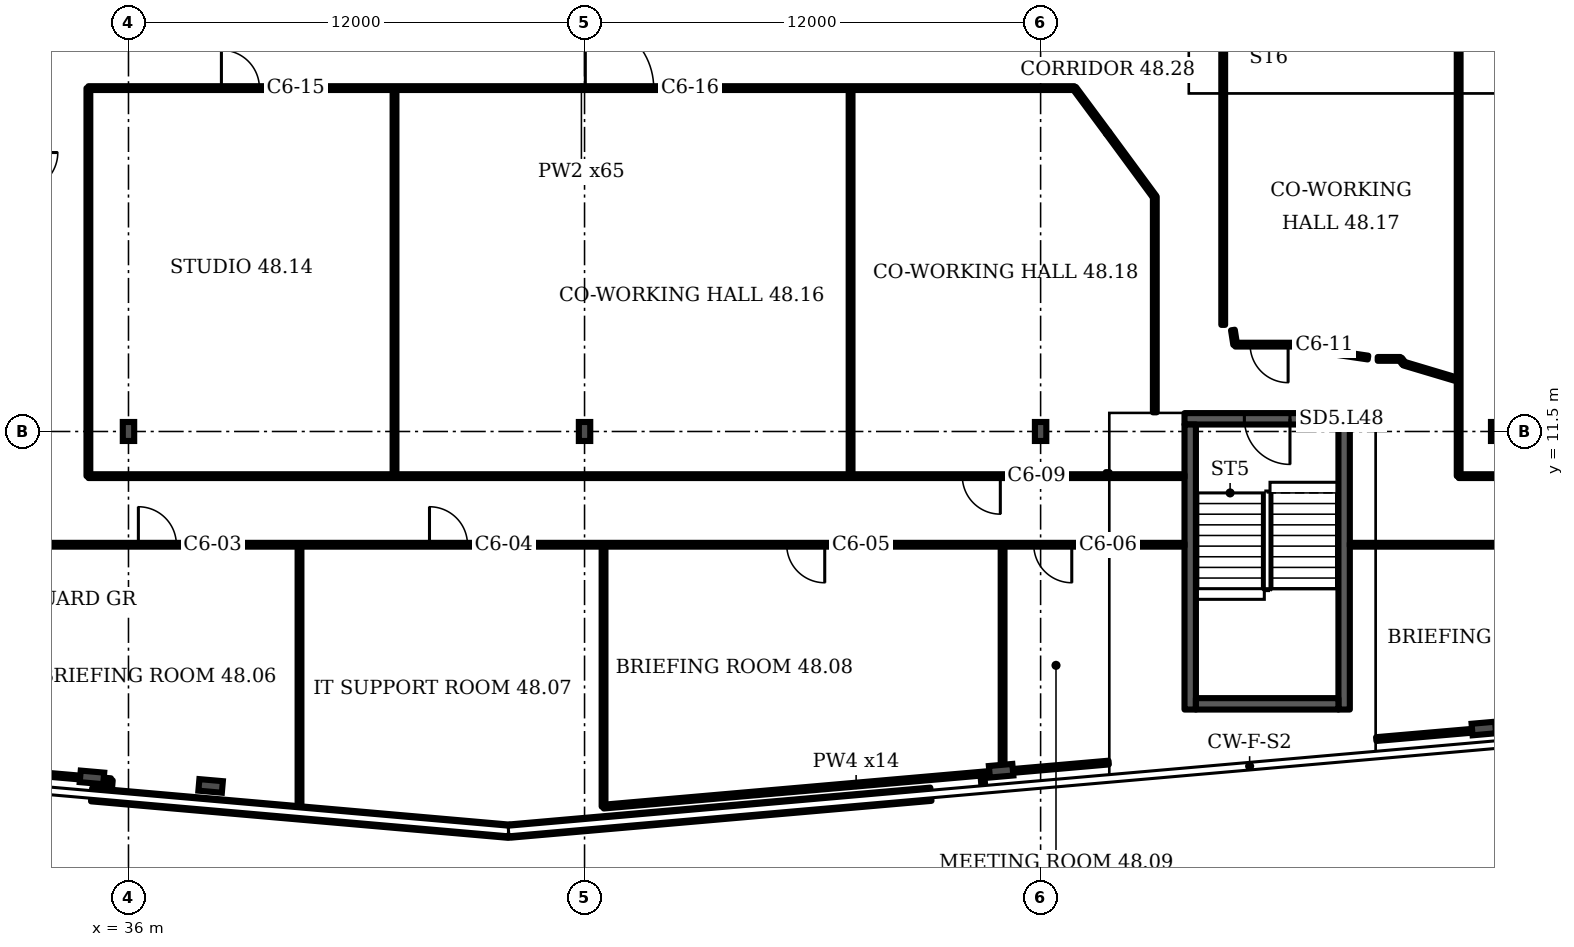
"""IFC4 building model, lengths in metres.
Left out: names, types, materials, properties, quantities, classifications, styles, units other than length and angle.
Written with IfcOpenShell. Run it as: python <this file> out.ifc"""

import sys

from ifc_helpers import new_model, si_unit, direction, frame, frame_2d, origin, origin_2d, place, context, subcontext, project, spatial, rectangle, i_section, extrude, element, fill, save


model = new_model("IFC4")
c1 = context("Model", 3, precision=1e-05, world=origin(), true_north=direction((0.0, 1.0)))
c2 = subcontext(c1, "Body", "Model", "MODEL_VIEW")
j1 = project(units=[si_unit("LENGTHUNIT", "METRE"), si_unit("PLANEANGLEUNIT", "RADIAN")], contexts=[c1])
p1 = place(None, origin())
s1 = spatial("IfcSite", under=j1, at=p1, CompositionType="ELEMENT")
p2 = place(p1, origin())
s2 = spatial("IfcBuilding", under=s1, at=p2, CompositionType="ELEMENT")
p3 = place(p2, frame((0.0, 0.0, 195.1)))
s3 = spatial("IfcBuildingStorey", under=s2, at=p3, CompositionType="ELEMENT", Elevation=195.1)
for number, where, z_axis, x_axis in (
    (1, (35.039, 2.399, 0.0), (0.0, 0.0, 1.0), (-0.087, -0.996, 0.0)),
    (2, (38.161, 2.174, 0.0), (0.0, 0.0, 1.0), (-0.087, -0.996, 0.0)),
    (3, (58.961, 2.573, 0.0), (0.0, 0.0, 1.0), (0.087, -0.996, 0.0)),
    (4, (71.662, 3.685, 0.0), (0.0, 0.0, 1.0), (0.087, -0.996, 0.0)),
):
    element("IfcColumn", number, at=place(p3, frame(where, z_axis=z_axis, x_axis=x_axis)), inside=s3, PredefinedType="COLUMN", context=c2, shape_type="SweptSolid", body=[
        extrude(i_section(OverallWidth=0.305, OverallDepth=0.62, WebThickness=0.021, FlangeThickness=0.04, FilletRadius=0.027, at=origin_2d()), origin(), (0.0, 0.0, 1.0), 3.6),
    ])
for number, where, z_axis, x_axis in (
    (5, (36.0, 11.5, 0.0), (0.0, 0.0, 1.0), (1.0, 0.0, 0.0)),
    (6, (48.0, 11.5, 0.0), (0.0, 0.0, 1.0), (1.0, 0.0, 0.0)),
    (7, (60.0, 11.5, 0.0), (0.0, 0.0, 1.0), (1.0, 0.0, 0.0)),
    (8, (72.0, 11.5, 0.0), (0.0, 0.0, 1.0), (1.0, 0.0, 0.0)),
):
    element("IfcColumn", number, at=place(p3, frame(where, z_axis=z_axis, x_axis=x_axis)), inside=s3, PredefinedType="COLUMN", context=c2, shape_type="SweptSolid", body=[
        extrude(i_section(OverallWidth=0.3, OverallDepth=0.5, WebThickness=0.014, FlangeThickness=0.028, FilletRadius=0.027, at=origin_2d()), origin(), (0.0, 0.0, 1.0), 3.6),
    ])
p4 = place(p3, frame((35.03, 1.943, 0.0), z_axis=(0.0, 0.0, 1.0), x_axis=(0.996199, -0.08714, 0.0)))
e9 = element("IfcWall", 9, at=p4, inside=s3, PredefinedType="SOLIDWALL", context=c2, shape_type="SweptSolid", body=[
    extrude(rectangle(XDim=11.028, YDim=0.35, at=frame_2d((5.514, 0.0))), origin(), (0.0, 0.0, 1.0), 1.0),
])
p5 = place(p3, frame((46.045, 0.987, 0.0), z_axis=(0.0, 0.0, 1.0), x_axis=(0.996193, 0.087171, 0.0)))
e10 = element("IfcWall", 10, at=p5, inside=s3, PredefinedType="SOLIDWALL", context=c2, shape_type="SweptSolid", body=[
    extrude(rectangle(XDim=11.11, YDim=0.35, at=frame_2d((5.555, 0.0))), origin(), (0.0, 0.0, 1.0), 1.0),
])
p6 = place(p3, frame((63.786, 11.834, 0.0), z_axis=(0.0, 0.0, 1.0), x_axis=(1.0, 0.0, 0.0)))
e11 = element("IfcWall", 11, at=p6, inside=s3, PredefinedType="SHEAR", context=c2, shape_type="SweptSolid", body=[
    extrude(rectangle(XDim=4.35, YDim=0.3, at=frame_2d((2.175, 0.0))), origin(), (0.0, 0.0, 1.0), 3.2),
])
p7 = place(p6, frame((1.575, 0.0, 0.0)))
e12 = element("IfcOpeningElement", 12, at=p7, cuts=e11, PredefinedType="OPENING", context=c2, shape_type="SweptSolid", body=[
    extrude(rectangle(XDim=1.2, YDim=2.1, at=frame_2d((0.6, 1.05))), frame((0.0, 0.16, 0.0), z_axis=(0.0, -1.0, 0.0), x_axis=(1.0, 0.0, 0.0)), (0.0, 0.0, 1.0), 0.32),
])
p8 = place(p3, frame((31.714, 8.52, 0.0), z_axis=(0.0, 0.0, 1.0), x_axis=(1.0, 0.0, 0.0)))
e13 = element("IfcWall", 13, at=p8, inside=s3, PredefinedType="PARTITIONING", context=c2, shape_type="SweptSolid", body=[
    extrude(rectangle(XDim=32.072, YDim=0.1, at=frame_2d((16.036, 0.0))), origin(), (0.0, 0.0, 1.0), 3.2),
])
p9 = place(p8, frame((4.546, 0.0, 0.0)))
e14 = element("IfcOpeningElement", 14, at=p9, cuts=e13, PredefinedType="OPENING", context=c2, shape_type="SweptSolid", body=[
    extrude(rectangle(XDim=1.0, YDim=2.1, at=frame_2d((0.5, 1.05))), frame((0.0, 0.06, 0.0), z_axis=(0.0, -1.0, 0.0), x_axis=(1.0, 0.0, 0.0)), (0.0, 0.0, 1.0), 0.12),
])
p10 = place(p8, frame((12.206, 0.0, 0.0)))
e15 = element("IfcOpeningElement", 15, at=p10, cuts=e13, PredefinedType="OPENING", context=c2, shape_type="SweptSolid", body=[
    extrude(rectangle(XDim=1.0, YDim=2.1, at=frame_2d((0.5, 1.05))), frame((0.0, 0.06, 0.0), z_axis=(0.0, -1.0, 0.0), x_axis=(1.0, 0.0, 0.0)), (0.0, 0.0, 1.0), 0.12),
])
p11 = place(p8, frame((21.606, 0.0, 0.0)))
e16 = element("IfcOpeningElement", 16, at=p11, cuts=e13, PredefinedType="OPENING", context=c2, shape_type="SweptSolid", body=[
    extrude(rectangle(XDim=1.0, YDim=2.1, at=frame_2d((0.5, 1.05))), frame((0.0, 0.06, 0.0), z_axis=(0.0, -1.0, 0.0), x_axis=(1.0, 0.0, 0.0)), (0.0, 0.0, 1.0), 0.12),
])
p12 = place(p8, frame((28.106, 0.0, 0.0)))
e17 = element("IfcOpeningElement", 17, at=p12, cuts=e13, PredefinedType="OPENING", context=c2, shape_type="SweptSolid", body=[
    extrude(rectangle(XDim=1.0, YDim=2.1, at=frame_2d((0.5, 1.05))), frame((0.0, 0.06, 0.0), z_axis=(0.0, -1.0, 0.0), x_axis=(1.0, 0.0, 0.0)), (0.0, 0.0, 1.0), 0.12),
])
p13 = place(p3, frame((34.945, 10.325, 0.0), z_axis=(0.0, 0.0, 1.0), x_axis=(0.0, 1.0, 0.0)))
e18 = element("IfcWall", 18, at=p13, inside=s3, PredefinedType="PARTITIONING", context=c2, shape_type="SweptSolid", body=[
    extrude(rectangle(XDim=10.21, YDim=0.1, at=frame_2d((5.105, 0.0))), origin(), (0.0, 0.0, 1.0), 3.2),
])
p14 = place(p3, frame((34.945, 10.325, 0.0), z_axis=(0.0, 0.0, 1.0), x_axis=(1.0, 0.0, 0.0)))
e19 = element("IfcWall", 19, at=p14, inside=s3, PredefinedType="PARTITIONING", context=c2, shape_type="SweptSolid", body=[
    extrude(rectangle(XDim=28.841, YDim=0.1, at=frame_2d((14.421, 0.0))), origin(), (0.0, 0.0, 1.0), 3.2),
])
p15 = place(p14, frame((22.995, 0.0, 0.0)))
e20 = element("IfcOpeningElement", 20, at=p15, cuts=e19, PredefinedType="OPENING", context=c2, shape_type="SweptSolid", body=[
    extrude(rectangle(XDim=1.0, YDim=2.1, at=frame_2d((0.5, 1.05))), frame((0.0, 0.06, 0.0), z_axis=(0.0, -1.0, 0.0), x_axis=(1.0, 0.0, 0.0)), (0.0, 0.0, 1.0), 0.12),
])
p16 = place(p3, frame((34.945, 20.535, 0.0), z_axis=(0.0, 0.0, 1.0), x_axis=(1.0, 0.0, 0.0)))
e21 = element("IfcWall", 21, at=p16, inside=s3, PredefinedType="PARTITIONING", context=c2, shape_type="SweptSolid", body=[
    extrude(rectangle(XDim=25.945, YDim=0.1, at=frame_2d((12.972, 0.0))), origin(), (0.0, 0.0, 1.0), 3.2),
])
p17 = place(p16, frame((3.5, 0.0, 0.0)))
e22 = element("IfcOpeningElement", 22, at=p17, cuts=e21, PredefinedType="OPENING", context=c2, shape_type="SweptSolid", body=[
    extrude(rectangle(XDim=1.0, YDim=2.1, at=frame_2d((0.5, 1.05))), frame((0.0, 0.06, 0.0), z_axis=(0.0, -1.0, 0.0), x_axis=(1.0, 0.0, 0.0)), (0.0, 0.0, 1.0), 0.12),
])
p18 = place(p16, frame((13.075, 0.0, 0.0)))
e23 = element("IfcOpeningElement", 23, at=p18, cuts=e21, PredefinedType="OPENING", context=c2, shape_type="SweptSolid", body=[
    extrude(rectangle(XDim=1.8, YDim=2.1, at=frame_2d((0.9, 1.05))), frame((0.0, 0.06, 0.0), z_axis=(0.0, -1.0, 0.0), x_axis=(1.0, 0.0, 0.0)), (0.0, 0.0, 1.0), 0.12),
])
p19 = place(p3, frame((35.502, 1.927, 0.0), z_axis=(0.0, 0.0, 1.0), x_axis=(0.083045, 0.996542, 0.0)))
e24 = element("IfcWall", 24, at=p19, inside=s3, PredefinedType="PARTITIONING", context=c2, shape_type="SweptSolid", body=[
    extrude(rectangle(XDim=0.4, YDim=0.1, at=frame_2d((0.2, 0.0))), origin(), (0.0, 0.0, 1.0), 3.2),
])
p20 = place(p3, frame((35.535, 2.325, 0.0), z_axis=(0.0, 0.0, 1.0), x_axis=(-0.996311, 0.085867, 0.0)))
e25 = element("IfcWall", 25, at=p20, inside=s3, PredefinedType="PARTITIONING", context=c2, shape_type="SweptSolid", body=[
    extrude(rectangle(XDim=2.485, YDim=0.1, at=frame_2d((1.243, 0.0))), origin(), (0.0, 0.0, 1.0), 2.58),
])
p21 = place(p3, frame((40.5, 1.489, 0.0), z_axis=(0.0, 0.0, 1.0), x_axis=(0.0, 1.0, 0.0)))
e26 = element("IfcWall", 26, at=p21, inside=s3, PredefinedType="PARTITIONING", context=c2, shape_type="SweptSolid", body=[
    extrude(rectangle(XDim=7.031, YDim=0.1, at=frame_2d((3.515, 0.0))), origin(), (0.0, 0.0, 1.0), 3.2),
])
p22 = place(p3, frame((43.0, 10.33, 0.0), z_axis=(0.0, 0.0, 1.0), x_axis=(0.0, 1.0, 0.0)))
e27 = element("IfcWall", 27, at=p22, inside=s3, PredefinedType="PARTITIONING", context=c2, shape_type="SweptSolid", body=[
    extrude(rectangle(XDim=10.205, YDim=0.1, at=frame_2d((5.103, 0.0))), origin(), (0.0, 0.0, 1.0), 3.2),
])
p23 = place(p3, frame((48.5, 1.63, 0.0), z_axis=(0.0, 0.0, 1.0), x_axis=(0.0, 1.0, 0.0)))
e28 = element("IfcWall", 28, at=p23, inside=s3, PredefinedType="PARTITIONING", context=c2, shape_type="SweptSolid", body=[
    extrude(rectangle(XDim=6.89, YDim=0.1, at=frame_2d((3.445, 0.0))), origin(), (0.0, 0.0, 1.0), 3.2),
])
p24 = place(p3, frame((48.5, 1.63, 0.0), z_axis=(0.0, 0.0, 1.0), x_axis=(0.996225, 0.086828, 0.0)))
e29 = element("IfcWall", 29, at=p24, inside=s3, PredefinedType="PARTITIONING", context=c2, shape_type="SweptSolid", body=[
    extrude(rectangle(XDim=13.342, YDim=0.1, at=frame_2d((6.671, 0.0))), origin(), (0.0, 0.0, 1.0), 2.58),
])
p25 = place(p3, frame((55.0, 10.325, 0.0), z_axis=(0.0, 0.0, 1.0), x_axis=(0.0, 1.0, 0.0)))
e30 = element("IfcWall", 30, at=p25, inside=s3, PredefinedType="PARTITIONING", context=c2, shape_type="SweptSolid", body=[
    extrude(rectangle(XDim=10.21, YDim=0.1, at=frame_2d((5.105, 0.0))), origin(), (0.0, 0.0, 1.0), 3.2),
])
p26 = place(p3, frame((58.498, 2.102, 0.0), z_axis=(0.0, 0.0, 1.0), x_axis=(-0.083045, 0.996542, 0.0)))
e31 = element("IfcWall", 31, at=p26, inside=s3, PredefinedType="PARTITIONING", context=c2, shape_type="SweptSolid", body=[
    extrude(rectangle(XDim=0.4, YDim=0.1, at=frame_2d((0.2, 0.0))), origin(), (0.0, 0.0, 1.0), 3.2),
])
p27 = place(p3, frame((59.0, 2.545, 0.0), z_axis=(0.0, 0.0, 1.0), x_axis=(0.0, 1.0, 0.0)))
e32 = element("IfcWall", 32, at=p27, inside=s3, PredefinedType="PARTITIONING", context=c2, shape_type="SweptSolid", body=[
    extrude(rectangle(XDim=5.975, YDim=0.1, at=frame_2d((2.988, 0.0))), origin(), (0.0, 0.0, 1.0), 3.2),
])
p28 = place(p3, frame((61.765, 10.325, 0.0), z_axis=(0.0, 0.0, 1.0), x_axis=(0.0, 1.0, 0.0)))
e33 = element("IfcWall", 33, at=p28, inside=s3, PredefinedType="PARTITIONING", context=c2, shape_type="SweptSolid", body=[
    extrude(rectangle(XDim=0.105, YDim=0.1, at=frame_2d((0.052, 0.0))), origin(), (0.0, 0.0, 1.0), 3.2),
])
p29 = place(p3, frame((61.765, 19.355, 0.0), z_axis=(0.0, 0.0, 1.0), x_axis=(-0.595656, 0.803238, 0.0)))
e34 = element("IfcWall", 34, at=p29, inside=s3, PredefinedType="PARTITIONING", context=c2, shape_type="SweptSolid", body=[
    extrude(rectangle(XDim=1.469, YDim=0.1, at=frame_2d((0.734, 0.0))), origin(), (0.0, 0.0, 1.0), 3.2),
])
p30 = place(p3, frame((63.005, 17.67, 0.0), z_axis=(0.0, 0.0, 1.0), x_axis=(-0.592694, 0.805429, 0.0)))
e35 = element("IfcWall", 35, at=p30, inside=s3, PredefinedType="PARTITIONING", context=c2, shape_type="SweptSolid", body=[
    extrude(rectangle(XDim=2.092, YDim=0.1, at=frame_2d((1.046, 0.0))), origin(), (0.0, 0.0, 1.0), 3.2),
])
p31 = place(p3, frame((63.005, 12.004, 0.0), z_axis=(0.0, 0.0, 1.0), x_axis=(0.0, 1.0, 0.0)))
e36 = element("IfcWall", 36, at=p31, inside=s3, PredefinedType="PARTITIONING", context=c2, shape_type="SweptSolid", body=[
    extrude(rectangle(XDim=5.666, YDim=0.1, at=frame_2d((2.833, 0.0))), origin(), (0.0, 0.0, 1.0), 3.2),
])
p32 = place(p3, frame((64.805, 14.305, 0.0), z_axis=(0.0, 0.0, 1.0), x_axis=(0.0, 1.0, 0.0)))
e37 = element("IfcWall", 37, at=p32, inside=s3, PredefinedType="PARTITIONING", context=c2, shape_type="SweptSolid", body=[
    extrude(rectangle(XDim=7.42, YDim=0.1, at=frame_2d((3.71, 0.0))), origin(), (0.0, 0.0, 1.0), 3.2),
])
p33 = place(p3, frame((65.12, 13.785, 0.0), z_axis=(0.0, 0.0, 1.0), x_axis=(-0.154128, 0.988048, 0.0)))
e38 = element("IfcWall", 38, at=p33, inside=s3, PredefinedType="PARTITIONING", context=c2, shape_type="SweptSolid", body=[
    extrude(rectangle(XDim=0.39, YDim=0.1, at=frame_2d((0.195, 0.0))), origin(), (0.0, 0.0, 1.0), 3.2),
])
p34 = place(p3, frame((65.12, 13.785, 0.0), z_axis=(0.0, 0.0, 1.0), x_axis=(1.0, 0.0, 0.0)))
e39 = element("IfcWall", 39, at=p34, inside=s3, PredefinedType="PARTITIONING", context=c2, shape_type="SweptSolid", body=[
    extrude(rectangle(XDim=1.74, YDim=0.1, at=frame_2d((0.87, 0.0))), origin(), (0.0, 0.0, 1.0), 3.2),
])
p35 = place(p34, frame((0.392, 0.0, 0.0)))
e40 = element("IfcOpeningElement", 40, at=p35, cuts=e39, PredefinedType="OPENING", context=c2, shape_type="SweptSolid", body=[
    extrude(rectangle(XDim=1.0, YDim=2.1, at=frame_2d((0.5, 1.05))), frame((0.0, 0.06, 0.0), z_axis=(0.0, -1.0, 0.0), x_axis=(1.0, 0.0, 0.0)), (0.0, 0.0, 1.0), 0.12),
])
p36 = place(p3, frame((66.975, 13.685, 0.0), z_axis=(0.0, 0.0, 1.0), x_axis=(-0.755051, 0.65566, 0.0)))
e41 = element("IfcWall", 41, at=p36, inside=s3, PredefinedType="PARTITIONING", context=c2, shape_type="SweptSolid", body=[
    extrude(rectangle(XDim=0.152, YDim=0.1, at=frame_2d((0.076, 0.0))), origin(), (0.0, 0.0, 1.0), 3.2),
])
p37 = place(p3, frame((68.136, 8.52, 0.0), z_axis=(0.0, 0.0, 1.0), x_axis=(1.0, 0.0, 0.0)))
e42 = element("IfcWall", 42, at=p37, inside=s3, PredefinedType="PARTITIONING", context=c2, shape_type="SweptSolid", body=[
    extrude(rectangle(XDim=15.141, YDim=0.1, at=frame_2d((7.57, 0.0))), origin(), (0.0, 0.0, 1.0), 2.58),
])
p38 = place(p37, frame((5.094, 0.0, 0.0)))
e43 = element("IfcOpeningElement", 43, at=p38, cuts=e42, PredefinedType="OPENING", context=c2, shape_type="SweptSolid", body=[
    extrude(rectangle(XDim=1.0, YDim=2.1, at=frame_2d((0.5, 1.05))), frame((0.0, 0.06, 0.0), z_axis=(0.0, -1.0, 0.0), x_axis=(1.0, 0.0, 0.0)), (0.0, 0.0, 1.0), 0.12),
])
p39 = place(p37, frame((12.184, 0.0, 0.0)))
e44 = element("IfcOpeningElement", 44, at=p39, cuts=e42, PredefinedType="OPENING", context=c2, shape_type="SweptSolid", body=[
    extrude(rectangle(XDim=1.0, YDim=2.1, at=frame_2d((0.5, 1.05))), frame((0.0, 0.06, 0.0), z_axis=(0.0, -1.0, 0.0), x_axis=(1.0, 0.0, 0.0)), (0.0, 0.0, 1.0), 0.12),
])
p40 = place(p3, frame((68.615, 13.445, 0.0), z_axis=(0.0, 0.0, 1.0), x_axis=(-0.989463, 0.144803, 0.0)))
e45 = element("IfcWall", 45, at=p40, inside=s3, PredefinedType="PARTITIONING", context=c2, shape_type="SweptSolid", body=[
    extrude(rectangle(XDim=1.657, YDim=0.1, at=frame_2d((0.829, 0.0))), origin(), (0.0, 0.0, 1.0), 3.2),
])
p41 = place(p3, frame((68.831, 3.407, 0.0), z_axis=(0.0, 0.0, 1.0), x_axis=(0.996283, 0.086167, 0.0)))
e46 = element("IfcWall", 46, at=p41, inside=s3, PredefinedType="PARTITIONING", context=c2, shape_type="SweptSolid", body=[
    extrude(rectangle(XDim=3.346, YDim=0.1, at=frame_2d((1.673, 0.0))), origin(), (0.0, 0.0, 1.0), 2.58),
])
p42 = place(p3, frame((68.87, 13.41, 0.0), z_axis=(0.0, 0.0, 1.0), x_axis=(1.0, 0.0, 0.0)))
e47 = element("IfcWall", 47, at=p42, inside=s3, PredefinedType="PARTITIONING", context=c2, shape_type="SweptSolid", body=[
    extrude(rectangle(XDim=0.595, YDim=0.1, at=frame_2d((0.297, 0.0))), origin(), (0.0, 0.0, 1.0), 3.2),
])
p43 = place(p3, frame((69.56, 13.285, 0.0), z_axis=(0.0, 0.0, 1.0), x_axis=(-0.604968, 0.796256, 0.0)))
e48 = element("IfcWall", 48, at=p43, inside=s3, PredefinedType="PARTITIONING", context=c2, shape_type="SweptSolid", body=[
    extrude(rectangle(XDim=0.157, YDim=0.1, at=frame_2d((0.079, 0.0))), origin(), (0.0, 0.0, 1.0), 3.2),
])
p44 = place(p3, frame((70.9, 12.885, 0.0), z_axis=(0.0, 0.0, 1.0), x_axis=(-0.958229, 0.286002, 0.0)))
e49 = element("IfcWall", 49, at=p44, inside=s3, PredefinedType="PARTITIONING", context=c2, shape_type="SweptSolid", body=[
    extrude(rectangle(XDim=1.398, YDim=0.1, at=frame_2d((0.699, 0.0))), origin(), (0.0, 0.0, 1.0), 3.2),
])
p45 = place(p3, frame((71.0, 10.325, 0.0), z_axis=(0.0, 0.0, 1.0), x_axis=(0.0, 1.0, 0.0)))
e50 = element("IfcWall", 50, at=p45, inside=s3, PredefinedType="PARTITIONING", context=c2, shape_type="SweptSolid", body=[
    extrude(rectangle(XDim=11.4, YDim=0.1, at=frame_2d((5.7, 0.0))), origin(), (0.0, 0.0, 1.0), 3.2),
])
p46 = place(p3, frame((71.0, 10.325, 0.0), z_axis=(0.0, 0.0, 1.0), x_axis=(1.0, 0.0, 0.0)))
e51 = element("IfcWall", 51, at=p46, inside=s3, PredefinedType="PARTITIONING", context=c2, shape_type="SweptSolid", body=[
    extrude(rectangle(XDim=11.532, YDim=0.1, at=frame_2d((5.766, 0.0))), origin(), (0.0, 0.0, 1.0), 2.58),
])
p47 = place(p46, frame((4.136, 0.0, 0.0)))
e52 = element("IfcOpeningElement", 52, at=p47, cuts=e51, PredefinedType="OPENING", context=c2, shape_type="SweptSolid", body=[
    extrude(rectangle(XDim=1.0, YDim=2.1, at=frame_2d((0.5, 1.05))), frame((0.0, 0.06, 0.0), z_axis=(0.0, -1.0, 0.0), x_axis=(1.0, 0.0, 0.0)), (0.0, 0.0, 1.0), 0.12),
])
for number, where, z_axis, x_axis in (
    (53, (63.936, 4.184, 0.0), (0.0, 0.0, 1.0), (0.0, 1.0, 0.0)),
    (54, (67.986, 4.184, 0.0), (0.0, 0.0, 1.0), (0.0, 1.0, 0.0)),
):
    element("IfcWall", number, at=place(p3, frame(where, z_axis=z_axis, x_axis=x_axis)), inside=s3, PredefinedType="SHEAR", context=c2, shape_type="SweptSolid", body=[
        extrude(rectangle(XDim=7.5, YDim=0.3, at=frame_2d((3.75, 0.0))), origin(), (0.0, 0.0, 1.0), 3.2),
    ])
p48 = place(p3, frame((64.086, 4.334, 0.0), z_axis=(0.0, 0.0, 1.0), x_axis=(1.0, 0.0, 0.0)))
e55 = element("IfcWall", 55, at=p48, inside=s3, PredefinedType="SHEAR", context=c2, shape_type="SweptSolid", body=[
    extrude(rectangle(XDim=3.75, YDim=0.3, at=frame_2d((1.875, 0.0))), origin(), (0.0, 0.0, 1.0), 3.2),
])
p49 = place(p7, origin())
e56 = element("IfcDoor", 56, at=p49, inside=s3, OperationType="SINGLE_SWING_RIGHT", PredefinedType="DOOR", context=c2, shape_type="SweptSolid", body=[
    extrude(rectangle(XDim=1.2, YDim=2.1, at=frame_2d((0.6, 1.05))), frame((0.0, 0.025, 0.0), z_axis=(0.0, -1.0, 0.0), x_axis=(1.0, 0.0, 0.0)), (0.0, 0.0, 1.0), 0.05),
])
fill(e12, e56)
p50 = place(p9, origin())
e57 = element("IfcDoor", 57, at=p50, inside=s3, OperationType="SINGLE_SWING_LEFT", PredefinedType="DOOR", context=c2, shape_type="SweptSolid", body=[
    extrude(rectangle(XDim=1.0, YDim=2.1, at=frame_2d((0.5, 1.05))), frame((0.0, 0.025, 0.0), z_axis=(0.0, -1.0, 0.0), x_axis=(1.0, 0.0, 0.0)), (0.0, 0.0, 1.0), 0.05),
])
fill(e14, e57)
p51 = place(p10, origin())
e58 = element("IfcDoor", 58, at=p51, inside=s3, OperationType="SINGLE_SWING_LEFT", PredefinedType="DOOR", context=c2, shape_type="SweptSolid", body=[
    extrude(rectangle(XDim=1.0, YDim=2.1, at=frame_2d((0.5, 1.05))), frame((0.0, 0.025, 0.0), z_axis=(0.0, -1.0, 0.0), x_axis=(1.0, 0.0, 0.0)), (0.0, 0.0, 1.0), 0.05),
])
fill(e15, e58)
p52 = place(p11, origin())
e59 = element("IfcDoor", 59, at=p52, inside=s3, OperationType="SINGLE_SWING_RIGHT", PredefinedType="DOOR", context=c2, shape_type="SweptSolid", body=[
    extrude(rectangle(XDim=1.0, YDim=2.1, at=frame_2d((0.5, 1.05))), frame((0.0, 0.025, 0.0), z_axis=(0.0, -1.0, 0.0), x_axis=(1.0, 0.0, 0.0)), (0.0, 0.0, 1.0), 0.05),
])
fill(e16, e59)
p53 = place(p12, origin())
e60 = element("IfcDoor", 60, at=p53, inside=s3, OperationType="SINGLE_SWING_RIGHT", PredefinedType="DOOR", context=c2, shape_type="SweptSolid", body=[
    extrude(rectangle(XDim=1.0, YDim=2.1, at=frame_2d((0.5, 1.05))), frame((0.0, 0.025, 0.0), z_axis=(0.0, -1.0, 0.0), x_axis=(1.0, 0.0, 0.0)), (0.0, 0.0, 1.0), 0.05),
])
fill(e17, e60)
p54 = place(p15, origin())
e61 = element("IfcDoor", 61, at=p54, inside=s3, OperationType="SINGLE_SWING_RIGHT", PredefinedType="DOOR", context=c2, shape_type="SweptSolid", body=[
    extrude(rectangle(XDim=1.0, YDim=2.1, at=frame_2d((0.5, 1.05))), frame((0.0, 0.025, 0.0), z_axis=(0.0, -1.0, 0.0), x_axis=(1.0, 0.0, 0.0)), (0.0, 0.0, 1.0), 0.05),
])
fill(e20, e61)
p55 = place(p35, origin())
e62 = element("IfcDoor", 62, at=p55, inside=s3, OperationType="SINGLE_SWING_RIGHT", PredefinedType="DOOR", context=c2, shape_type="SweptSolid", body=[
    extrude(rectangle(XDim=1.0, YDim=2.1, at=frame_2d((0.5, 1.05))), frame((0.0, 0.025, 0.0), z_axis=(0.0, -1.0, 0.0), x_axis=(1.0, 0.0, 0.0)), (0.0, 0.0, 1.0), 0.05),
])
fill(e40, e62)
p56 = place(p17, origin())
e63 = element("IfcDoor", 63, at=p56, inside=s3, OperationType="SINGLE_SWING_LEFT", PredefinedType="DOOR", context=c2, shape_type="SweptSolid", body=[
    extrude(rectangle(XDim=1.0, YDim=2.1, at=frame_2d((0.5, 1.05))), frame((0.0, 0.025, 0.0), z_axis=(0.0, -1.0, 0.0), x_axis=(1.0, 0.0, 0.0)), (0.0, 0.0, 1.0), 0.05),
])
fill(e22, e63)
p57 = place(p18, origin())
e64 = element("IfcDoor", 64, at=p57, inside=s3, OperationType="DOUBLE_DOOR_SINGLE_SWING", PredefinedType="DOOR", context=c2, shape_type="SweptSolid", body=[
    extrude(rectangle(XDim=1.8, YDim=2.1, at=frame_2d((0.9, 1.05))), frame((0.0, 0.025, 0.0), z_axis=(0.0, -1.0, 0.0), x_axis=(1.0, 0.0, 0.0)), (0.0, 0.0, 1.0), 0.05),
])
fill(e23, e64)
save(model, sys.argv[1])
